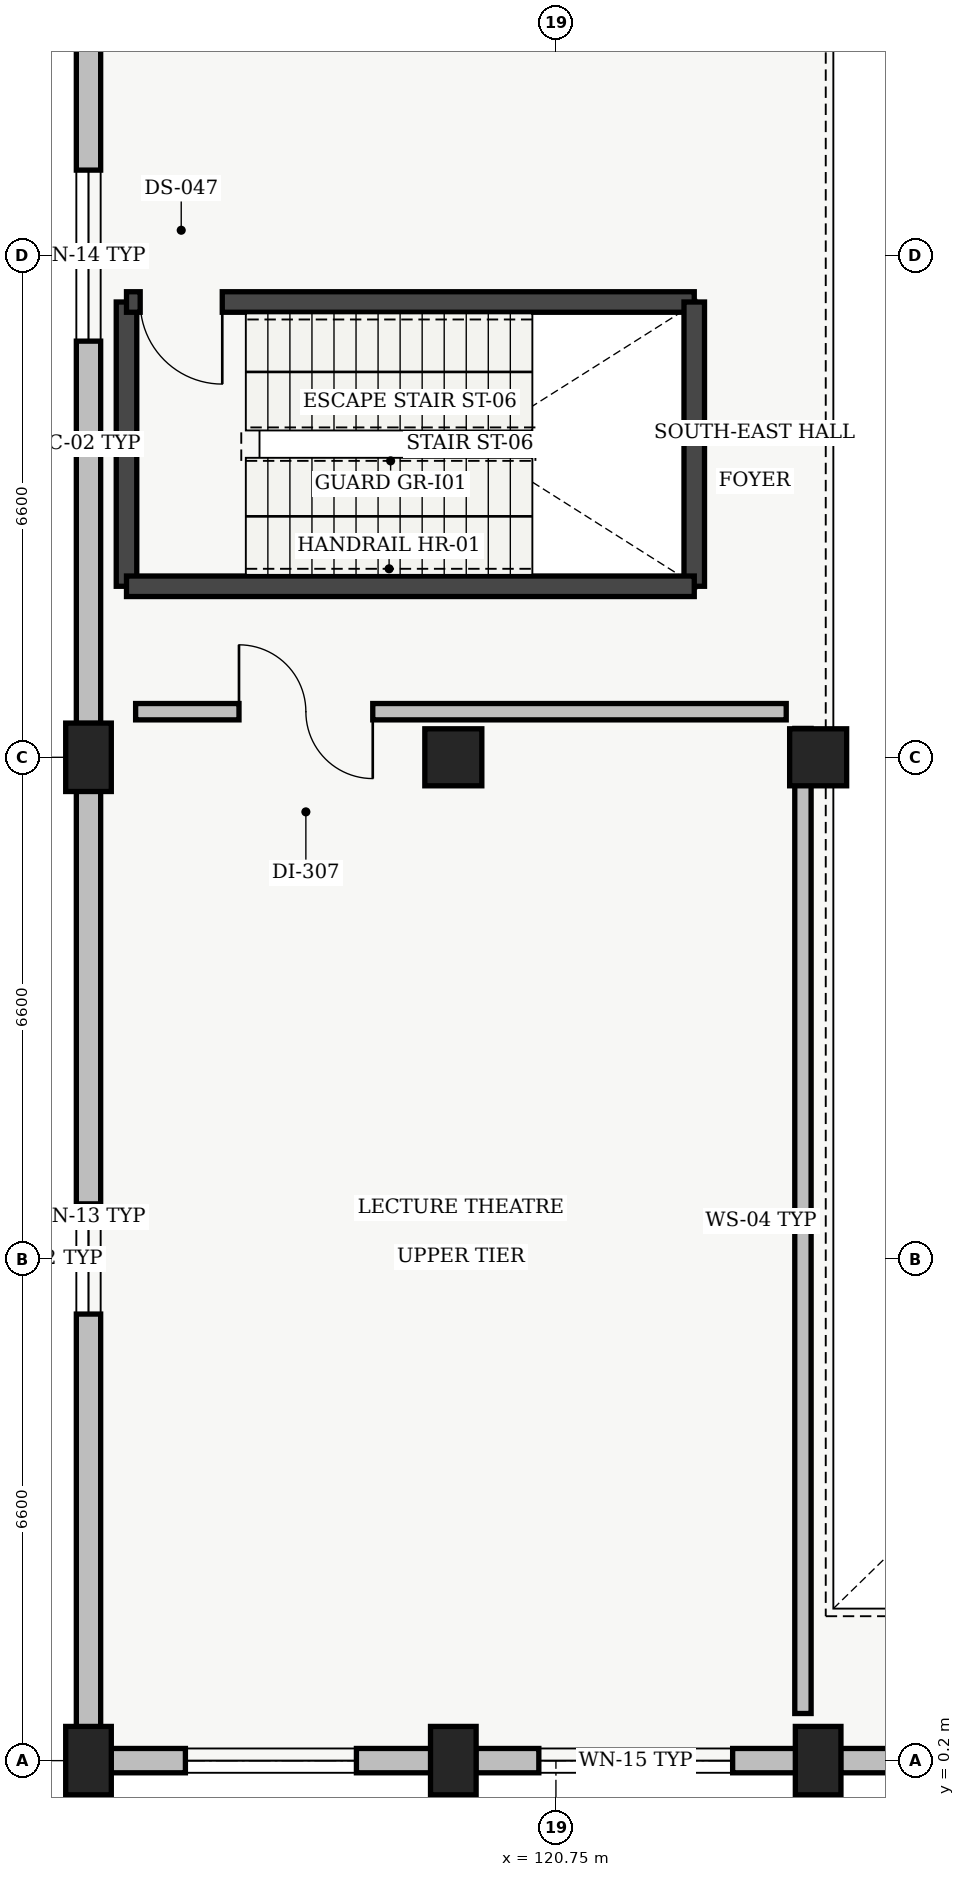
"""IFC4 building model, lengths in metres.
Left out: names, types, materials, properties, quantities, classifications, styles, units other than length and angle.
Written with IfcOpenShell. Run it as: python <this file> out.ifc"""

import sys

from ifc_helpers import new_model, si_unit, direction, frame, frame_2d, origin, origin_2d, place, context, subcontext, project, spatial, rectangle, circle, extrude, element, fill, save


model = new_model("IFC4")
c1 = context("Model", 3, precision=1e-05, world=origin(), true_north=direction((0.0, 1.0)))
c2 = subcontext(c1, "Body", "Model", "MODEL_VIEW")
j1 = project(units=[si_unit("LENGTHUNIT", "METRE"), si_unit("PLANEANGLEUNIT", "RADIAN")], contexts=[c1])
p1 = place(None, origin())
s1 = spatial("IfcSite", under=j1, at=p1, CompositionType="ELEMENT")
p2 = place(p1, origin())
s2 = spatial("IfcBuilding", under=s1, at=p2, CompositionType="ELEMENT")
p3 = place(p2, frame((0.0, 0.0, 5.1)))
s3 = spatial("IfcBuildingStorey", under=s2, at=p3, CompositionType="ELEMENT", Elevation=5.1)
for number, where, z_axis, x_axis in (
    (1, (114.6, 0.2, 0.0), (0.0, 0.0, 1.0), (1.0, 0.0, 0.0)),
    (2, (114.6, 13.4, 0.0), (0.0, 0.0, 1.0), (1.0, 0.0, 0.0)),
    (3, (119.4, 0.2, 0.0), (0.0, 0.0, 1.0), (1.0, 0.0, 0.0)),
):
    element("IfcColumn", number, at=place(p3, frame(where, z_axis=z_axis, x_axis=x_axis)), inside=s3, PredefinedType="COLUMN", context=c2, shape_type="SweptSolid", body=[
        extrude(rectangle(XDim=0.6, YDim=0.9, at=origin_2d()), origin(), (0.0, 0.0, 1.0), 4.08),
    ])
p4 = place(p3, frame((119.4, 13.4, 0.0), z_axis=(0.0, 0.0, 1.0), x_axis=(1.0, 0.0, 0.0)))
e4 = element("IfcColumn", 4, at=p4, inside=s3, PredefinedType="COLUMN", context=c2, shape_type="SweptSolid", body=[
    extrude(circle(Radius=0.375, at=origin_2d()), origin(), (0.0, 0.0, 1.0), 4.08),
])
p5 = place(p3, frame((124.2, 0.2, 0.0), z_axis=(0.0, 0.0, 1.0), x_axis=(1.0, 0.0, 0.0)))
e5 = element("IfcColumn", 5, at=p5, inside=s3, PredefinedType="COLUMN", context=c2, shape_type="SweptSolid", body=[
    extrude(rectangle(XDim=0.6, YDim=0.9, at=origin_2d()), origin(), (0.0, 0.0, 1.0), 4.08),
])
p6 = place(p3, frame((124.2, 13.4, 0.0), z_axis=(0.0, 0.0, 1.0), x_axis=(1.0, 0.0, 0.0)))
e6 = element("IfcColumn", 6, at=p6, inside=s3, PredefinedType="COLUMN", context=c2, shape_type="SweptSolid", body=[
    extrude(circle(Radius=0.375, at=origin_2d()), origin(), (0.0, 0.0, 1.0), 4.08),
])
p7 = place(p3, frame((114.6, 0.645, 0.0), z_axis=(0.0, 0.0, 1.0), x_axis=(0.0, 1.0, 0.0)))
e7 = element("IfcWall", 7, at=p7, inside=s3, PredefinedType="SOLIDWALL", context=c2, shape_type="SweptSolid", body=[
    extrude(rectangle(XDim=12.31, YDim=0.32, at=frame_2d((6.155, 0.0))), origin(), (0.0, 0.0, 1.0), 3.1),
])
p8 = place(p7, frame((5.43, 0.0, 0.95)))
e8 = element("IfcOpeningElement", 8, at=p8, cuts=e7, PredefinedType="OPENING", context=c2, shape_type="SweptSolid", body=[
    extrude(rectangle(XDim=1.45, YDim=1.35, at=frame_2d((0.725, 0.675))), frame((0.0, 0.16, 0.0), z_axis=(0.0, -1.0, 0.0), x_axis=(1.0, 0.0, 0.0)), (0.0, 0.0, 1.0), 0.32),
])
p9 = place(p3, frame((114.6, 13.845, 0.0), z_axis=(0.0, 0.0, 1.0), x_axis=(0.0, 1.0, 0.0)))
e9 = element("IfcWall", 9, at=p9, inside=s3, PredefinedType="SOLIDWALL", context=c2, shape_type="SweptSolid", body=[
    extrude(rectangle(XDim=12.31, YDim=0.32, at=frame_2d((6.155, 0.0))), origin(), (0.0, 0.0, 1.0), 3.1),
])
p10 = place(p9, frame((5.03, 0.0, 0.95)))
e10 = element("IfcOpeningElement", 10, at=p10, cuts=e9, PredefinedType="OPENING", context=c2, shape_type="SweptSolid", body=[
    extrude(rectangle(XDim=2.25, YDim=1.55, at=frame_2d((1.125, 0.775))), frame((0.0, 0.16, 0.0), z_axis=(0.0, -1.0, 0.0), x_axis=(1.0, 0.0, 0.0)), (0.0, 0.0, 1.0), 0.32),
])
p11 = place(p3, frame((128.705, 0.2, 0.0), z_axis=(0.0, 0.0, 1.0), x_axis=(-1.0, 0.0, 0.0)))
e11 = element("IfcWall", 11, at=p11, inside=s3, PredefinedType="SOLIDWALL", context=c2, shape_type="SweptSolid", body=[
    extrude(rectangle(XDim=4.21, YDim=0.32, at=frame_2d((2.105, 0.0))), origin(), (0.0, 0.0, 1.0), 3.1),
])
p12 = place(p3, frame((123.905, 0.2, 0.0), z_axis=(0.0, 0.0, 1.0), x_axis=(-1.0, 0.0, 0.0)))
e12 = element("IfcWall", 12, at=p12, inside=s3, PredefinedType="SOLIDWALL", context=c2, shape_type="SweptSolid", body=[
    extrude(rectangle(XDim=4.21, YDim=0.32, at=frame_2d((2.105, 0.0))), origin(), (0.0, 0.0, 1.0), 3.1),
])
p13 = place(p12, frame((0.83, 0.0, 0.95)))
e13 = element("IfcOpeningElement", 13, at=p13, cuts=e12, PredefinedType="OPENING", context=c2, shape_type="SweptSolid", body=[
    extrude(rectangle(XDim=2.55, YDim=1.75, at=frame_2d((1.275, 0.875))), frame((0.0, 0.16, 0.0), z_axis=(0.0, -1.0, 0.0), x_axis=(1.0, 0.0, 0.0)), (0.0, 0.0, 1.0), 0.32),
])
p14 = place(p3, frame((119.105, 0.2, 0.0), z_axis=(0.0, 0.0, 1.0), x_axis=(-1.0, 0.0, 0.0)))
e14 = element("IfcWall", 14, at=p14, inside=s3, PredefinedType="SOLIDWALL", context=c2, shape_type="SweptSolid", body=[
    extrude(rectangle(XDim=4.21, YDim=0.32, at=frame_2d((2.105, 0.0))), origin(), (0.0, 0.0, 1.0), 3.1),
])
p15 = place(p14, frame((0.98, 0.0, 0.95)))
e15 = element("IfcOpeningElement", 15, at=p15, cuts=e14, PredefinedType="OPENING", context=c2, shape_type="SweptSolid", body=[
    extrude(rectangle(XDim=2.25, YDim=1.55, at=frame_2d((1.125, 0.775))), frame((0.0, 0.16, 0.0), z_axis=(0.0, -1.0, 0.0), x_axis=(1.0, 0.0, 0.0)), (0.0, 0.0, 1.0), 0.32),
])
p16 = place(p3, frame((115.1, 15.65, 0.0), z_axis=(0.0, 0.0, 1.0), x_axis=(0.0, 1.0, 0.0)))
e16 = element("IfcWall", 16, at=p16, inside=s3, PredefinedType="SHEAR", context=c2, shape_type="SweptSolid", body=[
    extrude(rectangle(XDim=3.74, YDim=0.27, at=frame_2d((1.87, 0.0))), origin(), (0.0, 0.0, 1.0), 4.28),
])
p17 = place(p3, frame((115.1, 19.39, 0.0), z_axis=(0.0, 0.0, 1.0), x_axis=(1.0, 0.0, 0.0)))
e17 = element("IfcWall", 17, at=p17, inside=s3, PredefinedType="SHEAR", context=c2, shape_type="SweptSolid", body=[
    extrude(rectangle(XDim=7.47, YDim=0.27, at=frame_2d((3.735, 0.0))), origin(), (0.0, 0.0, 1.0), 4.28),
])
p18 = place(p17, frame((0.18, 0.0, 0.0)))
e18 = element("IfcOpeningElement", 18, at=p18, cuts=e17, PredefinedType="OPENING", context=c2, shape_type="SweptSolid", body=[
    extrude(rectangle(XDim=1.08, YDim=2.15, at=frame_2d((0.54, 1.075))), frame((0.0, 0.135, 0.0), z_axis=(0.0, -1.0, 0.0), x_axis=(1.0, 0.0, 0.0)), (0.0, 0.0, 1.0), 0.27),
])
p19 = place(p3, frame((122.57, 19.39, 0.0), z_axis=(0.0, 0.0, 1.0), x_axis=(0.0, -1.0, 0.0)))
e19 = element("IfcWall", 19, at=p19, inside=s3, PredefinedType="SHEAR", context=c2, shape_type="SweptSolid", body=[
    extrude(rectangle(XDim=3.74, YDim=0.27, at=frame_2d((1.87, 0.0))), origin(), (0.0, 0.0, 1.0), 4.28),
])
p20 = place(p3, frame((122.57, 15.65, 0.0), z_axis=(0.0, 0.0, 1.0), x_axis=(-1.0, 0.0, 0.0)))
e20 = element("IfcWall", 20, at=p20, inside=s3, PredefinedType="SHEAR", context=c2, shape_type="SweptSolid", body=[
    extrude(rectangle(XDim=7.47, YDim=0.27, at=frame_2d((3.735, 0.0))), origin(), (0.0, 0.0, 1.0), 4.28),
])
p21 = place(p3, frame((124.0, 0.82, 0.0), z_axis=(0.0, 0.0, 1.0), x_axis=(0.0, 1.0, 0.0)))
e21 = element("IfcWall", 21, at=p21, inside=s3, PredefinedType="SOLIDWALL", context=c2, shape_type="SweptSolid", body=[
    extrude(rectangle(XDim=12.96, YDim=0.215, at=frame_2d((6.48, 0.0))), origin(), (0.0, 0.0, 1.0), 3.2),
])
p22 = place(p3, frame((123.78, 14.0, 0.0), z_axis=(0.0, 0.0, 1.0), x_axis=(-1.0, 0.0, 0.0)))
e22 = element("IfcWall", 22, at=p22, inside=s3, PredefinedType="SOLIDWALL", context=c2, shape_type="SweptSolid", body=[
    extrude(rectangle(XDim=8.56, YDim=0.215, at=frame_2d((4.28, 0.0))), origin(), (0.0, 0.0, 1.0), 3.2),
])
p23 = place(p22, frame((5.44, 0.0, 0.0)))
e23 = element("IfcOpeningElement", 23, at=p23, cuts=e22, PredefinedType="OPENING", context=c2, shape_type="SweptSolid", body=[
    extrude(rectangle(XDim=1.76, YDim=2.25, at=frame_2d((0.88, 1.125))), frame((0.0, 0.107, 0.0), z_axis=(0.0, -1.0, 0.0), x_axis=(1.0, 0.0, 0.0)), (0.0, 0.0, 1.0), 0.215),
])
p24 = place(p8, origin())
e24 = element("IfcWindow", 24, at=p24, inside=s3, PartitioningType="SINGLE_PANEL", PredefinedType="WINDOW", context=c2, shape_type="SweptSolid", body=[
    extrude(rectangle(XDim=1.45, YDim=1.35, at=frame_2d((0.725, 0.675))), frame((0.0, 0.03, 0.0), z_axis=(0.0, -1.0, 0.0), x_axis=(1.0, 0.0, 0.0)), (0.0, 0.0, 1.0), 0.06),
])
fill(e8, e24)
p25 = place(p10, origin())
e25 = element("IfcWindow", 25, at=p25, inside=s3, PartitioningType="SINGLE_PANEL", PredefinedType="WINDOW", context=c2, shape_type="SweptSolid", body=[
    extrude(rectangle(XDim=2.25, YDim=1.55, at=frame_2d((1.125, 0.775))), frame((0.0, 0.03, 0.0), z_axis=(0.0, -1.0, 0.0), x_axis=(1.0, 0.0, 0.0)), (0.0, 0.0, 1.0), 0.06),
])
fill(e10, e25)
p26 = place(p13, origin())
e26 = element("IfcWindow", 26, at=p26, inside=s3, PartitioningType="SINGLE_PANEL", PredefinedType="WINDOW", context=c2, shape_type="SweptSolid", body=[
    extrude(rectangle(XDim=2.55, YDim=1.75, at=frame_2d((1.275, 0.875))), frame((0.0, 0.03, 0.0), z_axis=(0.0, -1.0, 0.0), x_axis=(1.0, 0.0, 0.0)), (0.0, 0.0, 1.0), 0.06),
])
fill(e13, e26)
p27 = place(p15, origin())
e27 = element("IfcWindow", 27, at=p27, inside=s3, PartitioningType="SINGLE_PANEL", PredefinedType="WINDOW", context=c2, shape_type="SweptSolid", body=[
    extrude(rectangle(XDim=2.25, YDim=1.55, at=frame_2d((1.125, 0.775))), frame((0.0, 0.03, 0.0), z_axis=(0.0, -1.0, 0.0), x_axis=(1.0, 0.0, 0.0)), (0.0, 0.0, 1.0), 0.06),
])
fill(e15, e27)
p28 = place(p18, origin())
e28 = element("IfcDoor", 28, at=p28, inside=s3, OperationType="SINGLE_SWING_RIGHT", PredefinedType="DOOR", context=c2, shape_type="SweptSolid", body=[
    extrude(rectangle(XDim=1.08, YDim=2.15, at=frame_2d((0.54, 1.075))), frame((0.0, 0.025, 0.0), z_axis=(0.0, -1.0, 0.0), x_axis=(1.0, 0.0, 0.0)), (0.0, 0.0, 1.0), 0.05),
])
fill(e18, e28)
p29 = place(p23, origin())
e29 = element("IfcDoor", 29, at=p29, inside=s3, OperationType="DOUBLE_DOOR_SINGLE_SWING", PredefinedType="DOOR", context=c2, shape_type="SweptSolid", body=[
    extrude(rectangle(XDim=1.76, YDim=2.25, at=frame_2d((0.88, 1.125))), frame((0.0, 0.025, 0.0), z_axis=(0.0, -1.0, 0.0), x_axis=(1.0, 0.0, 0.0)), (0.0, 0.0, 1.0), 0.05),
])
fill(e23, e29)
save(model, sys.argv[1])
